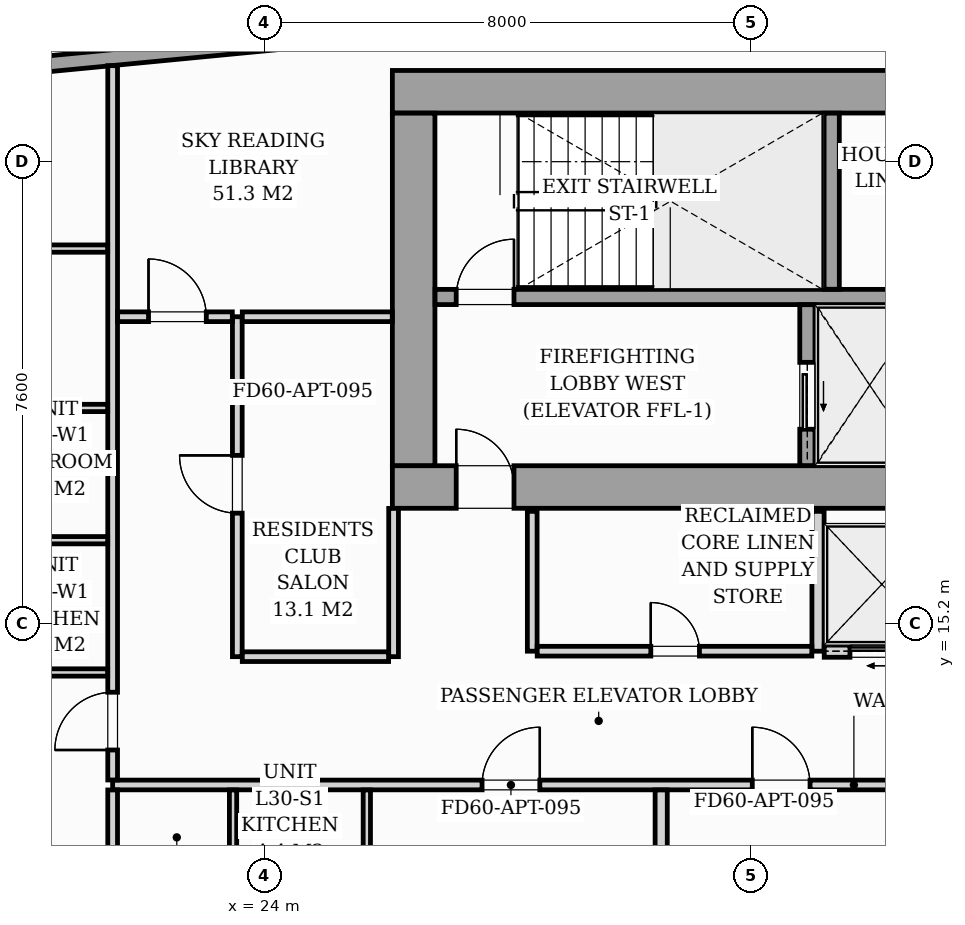
"""IFC4 building model, lengths in metres.
Left out: names, types, materials, properties, quantities, classifications, styles, units other than length and angle.
Written with IfcOpenShell. Run it as: python <this file> out.ifc"""

import sys

from ifc_helpers import new_model, si_unit, direction, frame, frame_2d, origin, origin_2d, place, context, subcontext, project, spatial, rectangle, i_section, extrude, source, transform, mapped, element, fill, save


model = new_model("IFC4")
c1 = context("Model", 3, precision=1e-05, world=origin(), true_north=direction((0.0, 1.0)))
c2 = subcontext(c1, "Body", "Model", "MODEL_VIEW")
j1 = project(units=[si_unit("LENGTHUNIT", "METRE"), si_unit("PLANEANGLEUNIT", "RADIAN")], contexts=[c1])
p1 = place(None, origin())
s1 = spatial("IfcSite", under=j1, at=p1, CompositionType="ELEMENT")
p2 = place(p1, origin())
s2 = spatial("IfcBuilding", under=s1, at=p2, CompositionType="ELEMENT")
p3 = place(p2, frame((0.0, 0.0, 106.6)))
s3 = spatial("IfcBuildingStorey", under=s2, at=p3, CompositionType="ELEMENT", Elevation=106.6)
m1 = source(origin(), c2, "Body", "SweptSolid", [
    extrude(i_section(OverallWidth=0.427, OverallDepth=0.483, WebThickness=0.051, FlangeThickness=0.082, FilletRadius=0.018, at=origin_2d()), origin(), (0.0, 0.0, 1.0), 3.196),
])
for number, where, z_axis, x_axis in (
    (1, (26.4, 17.4, 0.002), (0.0, 0.0, 1.0), (1.0, 0.0, 0.0)),
    (2, (33.12, 17.4, 0.002), (0.0, 0.0, 1.0), (1.0, 0.0, 0.0)),
    (3, (26.4, 24.0, 0.002), (0.0, 0.0, 1.0), (1.0, 0.0, 0.0)),
    (4, (33.12, 24.0, 0.002), (0.0, 0.0, 1.0), (1.0, 0.0, 0.0)),
):
    element("IfcColumn", number, at=place(p3, frame(where, z_axis=z_axis, x_axis=x_axis)), inside=s3, PredefinedType="PILASTER", context=c2, shape_type="MappedRepresentation", body=[
        mapped(m1, transform((0.0, 0.0, 0.0), scale=1.0)),
    ])
p4 = place(p3, frame((11.08, 23.508, 0.0), z_axis=(0.0, 0.0, 1.0), x_axis=(0.995396638587, 0.095841180552, 0.0)))
e5 = element("IfcWall", 5, at=p4, inside=s3, PredefinedType="STANDARD", context=c2, shape_type="SweptSolid", body=[
    extrude(rectangle(XDim=19.11, YDim=0.26, at=frame_2d((9.555, 0.0))), origin(), (0.0, 0.0, 1.0), 2.94),
])
p5 = place(p4, frame((7.159, 0.0, 0.0)))
e6 = element("IfcOpeningElement", 6, at=p5, cuts=e5, PredefinedType="OPENING", context=c2, shape_type="SweptSolid", body=[
    extrude(rectangle(XDim=1.8, YDim=2.06, at=frame_2d((0.9, 1.03))), frame((0.0, 0.14, 0.0), z_axis=(0.0, -1.0, 0.0), x_axis=(1.0, 0.0, 0.0)), (0.0, 0.0, 1.0), 0.28),
])
p6 = place(p4, frame((2.05, 0.0, 0.65)))
e7 = element("IfcOpeningElement", 7, at=p6, cuts=e5, PredefinedType="OPENING", context=c2, shape_type="SweptSolid", body=[
    extrude(rectangle(XDim=1.6, YDim=1.5, at=frame_2d((0.8, 0.75))), frame((0.0, 0.14, 0.0), z_axis=(0.0, -1.0, 0.0), x_axis=(1.0, 0.0, 0.0)), (0.0, 0.0, 1.0), 0.28),
])
p7 = place(p3, frame((26.1, 17.45, 0.0), z_axis=(0.0, 0.0, 1.0), x_axis=(1.0, 0.0, 0.0)))
e8 = element("IfcWall", 8, at=p7, inside=s3, PredefinedType="SHEAR", context=c2, shape_type="SweptSolid", body=[
    extrude(rectangle(XDim=19.8, YDim=0.7, at=frame_2d((9.9, 0.0))), origin(), (0.0, 0.0, 1.0), 3.2),
])
p8 = place(p7, frame((1.05, 0.0, 0.0)))
e9 = element("IfcOpeningElement", 9, at=p8, cuts=e8, PredefinedType="OPENING", context=c2, shape_type="SweptSolid", body=[
    extrude(rectangle(XDim=0.95, YDim=2.06, at=frame_2d((0.475, 1.03))), frame((0.0, 0.36, 0.0), z_axis=(0.0, -1.0, 0.0), x_axis=(1.0, 0.0, 0.0)), (0.0, 0.0, 1.0), 0.72),
])
p9 = place(p7, frame((9.48, 0.0, 0.0)))
e10 = element("IfcOpeningElement", 10, at=p9, cuts=e8, PredefinedType="OPENING", context=c2, shape_type="SweptSolid", body=[
    extrude(rectangle(XDim=0.85, YDim=2.0, at=frame_2d((0.425, 1.0))), frame((0.0, 0.36, 0.0), z_axis=(0.0, -1.0, 0.0), x_axis=(1.0, 0.0, 0.0)), (0.0, 0.0, 1.0), 0.72),
])
p10 = place(p7, frame((17.65, 0.0, 0.0)))
e11 = element("IfcOpeningElement", 11, at=p10, cuts=e8, PredefinedType="OPENING", context=c2, shape_type="SweptSolid", body=[
    extrude(rectangle(XDim=0.95, YDim=2.06, at=frame_2d((0.475, 1.03))), frame((0.0, 0.36, 0.0), z_axis=(0.0, -1.0, 0.0), x_axis=(1.0, 0.0, 0.0)), (0.0, 0.0, 1.0), 0.72),
])
p11 = place(p3, frame((26.1, 23.95, 0.0), z_axis=(0.0, 0.0, 1.0), x_axis=(1.0, 0.0, 0.0)))
e12 = element("IfcWall", 12, at=p11, inside=s3, PredefinedType="SHEAR", context=c2, shape_type="SweptSolid", body=[
    extrude(rectangle(XDim=19.8, YDim=0.7, at=frame_2d((9.9, 0.0))), origin(), (0.0, 0.0, 1.0), 3.2),
])
p12 = place(p3, frame((26.45, 17.802, 0.0), z_axis=(0.0, 0.0, 1.0), x_axis=(0.0, 1.0, 0.0)))
e13 = element("IfcWall", 13, at=p12, inside=s3, PredefinedType="SHEAR", context=c2, shape_type="SweptSolid", body=[
    extrude(rectangle(XDim=5.796, YDim=0.7, at=frame_2d((2.898, 0.0))), origin(), (0.0, 0.0, 1.0), 3.2),
])
p13 = place(p3, frame((26.802, 20.575, 0.0), z_axis=(0.0, 0.0, 1.0), x_axis=(1.0, 0.0, 0.0)))
e14 = element("IfcWall", 14, at=p13, inside=s3, PredefinedType="SOLIDWALL", context=c2, shape_type="SweptSolid", body=[
    extrude(rectangle(XDim=8.148, YDim=0.25, at=frame_2d((4.074, 0.0))), origin(), (0.0, 0.0, 1.0), 3.2),
])
p14 = place(p13, frame((0.348, 0.0, 0.0)))
e15 = element("IfcOpeningElement", 15, at=p14, cuts=e14, PredefinedType="OPENING", context=c2, shape_type="SweptSolid", body=[
    extrude(rectangle(XDim=0.95, YDim=2.06, at=frame_2d((0.475, 1.03))), frame((0.0, 0.135, 0.0), z_axis=(0.0, -1.0, 0.0), x_axis=(1.0, 0.0, 0.0)), (0.0, 0.0, 1.0), 0.27),
])
p15 = place(p3, frame((33.325, 20.702, 0.0), z_axis=(0.0, 0.0, 1.0), x_axis=(0.0, 1.0, 0.0)))
e16 = element("IfcWall", 16, at=p15, inside=s3, PredefinedType="SOLIDWALL", context=c2, shape_type="SweptSolid", body=[
    extrude(rectangle(XDim=2.896, YDim=0.25, at=frame_2d((1.448, 0.0))), origin(), (0.0, 0.0, 1.0), 3.2),
])
p16 = place(p3, frame((32.925, 17.802, 0.0), z_axis=(0.0, 0.0, 1.0), x_axis=(0.0, 1.0, 0.0)))
e17 = element("IfcWall", 17, at=p16, inside=s3, PredefinedType="SOLIDWALL", context=c2, shape_type="SweptSolid", body=[
    extrude(rectangle(XDim=2.646, YDim=0.25, at=frame_2d((1.323, 0.0))), origin(), (0.0, 0.0, 1.0), 3.2),
])
p17 = place(p16, frame((0.598, 0.0, 0.0)))
e18 = element("IfcOpeningElement", 18, at=p17, cuts=e17, PredefinedType="OPENING", context=c2, shape_type="SweptSolid", body=[
    extrude(rectangle(XDim=1.1, YDim=2.08, at=frame_2d((0.55, 1.04))), frame((0.0, 0.135, 0.0), z_axis=(0.0, -1.0, 0.0), x_axis=(1.0, 0.0, 0.0)), (0.0, 0.0, 1.0), 0.27),
])
p18 = place(p3, frame((28.4, 14.75, 0.0), z_axis=(0.0, 0.0, 1.0), x_axis=(0.0, 1.0, 0.0)))
e19 = element("IfcWall", 19, at=p18, inside=s3, PredefinedType="PARTITIONING", context=c2, shape_type="SweptSolid", body=[
    extrude(rectangle(XDim=2.3, YDim=0.16, at=frame_2d((1.15, 0.0))), origin(), (0.0, 0.0, 1.0), 2.94),
])
p19 = place(p3, frame((33.1, 14.75, 0.0), z_axis=(0.0, 0.0, 1.0), x_axis=(0.0, 1.0, 0.0)))
e20 = element("IfcWall", 20, at=p19, inside=s3, PredefinedType="PARTITIONING", context=c2, shape_type="SweptSolid", body=[
    extrude(rectangle(XDim=2.3, YDim=0.2, at=frame_2d((1.15, 0.0))), origin(), (0.0, 0.0, 1.0), 2.94),
])
p20 = place(p3, frame((28.482, 14.75, 0.0), z_axis=(0.0, 0.0, 1.0), x_axis=(1.0, 0.0, 0.0)))
e21 = element("IfcWall", 21, at=p20, inside=s3, PredefinedType="PARTITIONING", context=c2, shape_type="SweptSolid", body=[
    extrude(rectangle(XDim=4.516, YDim=0.16, at=frame_2d((2.258, 0.0))), origin(), (0.0, 0.0, 1.0), 2.94),
])
p21 = place(p20, frame((1.868, 0.0, 0.0)))
e22 = element("IfcOpeningElement", 22, at=p21, cuts=e21, PredefinedType="OPENING", context=c2, shape_type="SweptSolid", body=[
    extrude(rectangle(XDim=0.8, YDim=2.05, at=frame_2d((0.4, 1.025))), frame((0.0, 0.09, 0.0), z_axis=(0.0, -1.0, 0.0), x_axis=(1.0, 0.0, 0.0)), (0.0, 0.0, 1.0), 0.18),
])
p22 = place(p3, frame((33.202, 14.75, 0.0), z_axis=(0.0, 0.0, 1.0), x_axis=(1.0, 0.0, 0.0)))
e23 = element("IfcWall", 23, at=p22, inside=s3, PredefinedType="PARTITIONING", context=c2, shape_type="SweptSolid", body=[
    extrude(rectangle(XDim=1.896, YDim=0.2, at=frame_2d((0.948, 0.0))), origin(), (0.0, 0.0, 1.0), 2.94),
])
p23 = place(p22, frame((0.423, 0.0, 0.0)))
e24 = element("IfcOpeningElement", 24, at=p23, cuts=e23, PredefinedType="OPENING", context=c2, shape_type="SweptSolid", body=[
    extrude(rectangle(XDim=1.05, YDim=2.08, at=frame_2d((0.525, 1.04))), frame((0.0, 0.11, 0.0), z_axis=(0.0, -1.0, 0.0), x_axis=(1.0, 0.0, 0.0)), (0.0, 0.0, 1.0), 0.22),
])
p24 = place(p3, frame((21.5, 12.55, 0.0), z_axis=(0.0, 0.0, 1.0), x_axis=(1.0, 0.0, 0.0)))
e25 = element("IfcWall", 25, at=p24, inside=s3, PredefinedType="PARTITIONING", context=c2, shape_type="SweptSolid", body=[
    extrude(rectangle(XDim=24.38, YDim=0.16, at=frame_2d((12.19, 0.0))), origin(), (0.0, 0.0, 1.0), 2.94),
])
p25 = place(p24, frame((6.075, 0.0, 0.0)))
e26 = element("IfcOpeningElement", 26, at=p25, cuts=e25, PredefinedType="OPENING", context=c2, shape_type="SweptSolid", body=[
    extrude(rectangle(XDim=0.95, YDim=2.06, at=frame_2d((0.475, 1.03))), frame((0.0, 0.09, 0.0), z_axis=(0.0, -1.0, 0.0), x_axis=(1.0, 0.0, 0.0)), (0.0, 0.0, 1.0), 0.18),
])
p26 = place(p24, frame((10.519, 0.0, 0.0)))
e27 = element("IfcOpeningElement", 27, at=p26, cuts=e25, PredefinedType="OPENING", context=c2, shape_type="SweptSolid", body=[
    extrude(rectangle(XDim=0.95, YDim=2.06, at=frame_2d((0.475, 1.03))), frame((0.0, 0.09, 0.0), z_axis=(0.0, -1.0, 0.0), x_axis=(1.0, 0.0, 0.0)), (0.0, 0.0, 1.0), 0.18),
])
p27 = place(p24, frame((18.208, 0.0, 0.0)))
e28 = element("IfcOpeningElement", 28, at=p27, cuts=e25, PredefinedType="OPENING", context=c2, shape_type="SweptSolid", body=[
    extrude(rectangle(XDim=0.95, YDim=2.06, at=frame_2d((0.475, 1.03))), frame((0.0, 0.09, 0.0), z_axis=(0.0, -1.0, 0.0), x_axis=(1.0, 0.0, 0.0)), (0.0, 0.0, 1.0), 0.18),
])
p28 = place(p3, frame((21.5, 4.812, 0.0), z_axis=(0.0, 0.0, 1.0), x_axis=(0.0, 1.0, 0.0)))
e29 = element("IfcWall", 29, at=p28, inside=s3, PredefinedType="PARTITIONING", context=c2, shape_type="SweptSolid", body=[
    extrude(rectangle(XDim=7.656, YDim=0.16, at=frame_2d((3.828, 0.0))), origin(), (0.0, 0.0, 1.0), 2.94),
])
p29 = place(p3, frame((21.5, 12.632, 0.0), z_axis=(0.0, 0.0, 1.0), x_axis=(0.0, 1.0, 0.0)))
e30 = element("IfcWall", 30, at=p29, inside=s3, PredefinedType="PARTITIONING", context=c2, shape_type="SweptSolid", body=[
    extrude(rectangle(XDim=11.747, YDim=0.16, at=frame_2d((5.873, 0.0))), origin(), (0.0, 0.0, 1.0), 2.94),
])
p30 = place(p29, frame((0.493, 0.0, 0.0)))
e31 = element("IfcOpeningElement", 31, at=p30, cuts=e30, PredefinedType="OPENING", context=c2, shape_type="SweptSolid", body=[
    extrude(rectangle(XDim=0.95, YDim=2.06, at=frame_2d((0.475, 1.03))), frame((0.0, 0.09, 0.0), z_axis=(0.0, -1.0, 0.0), x_axis=(1.0, 0.0, 0.0)), (0.0, 0.0, 1.0), 0.18),
])
for number, where, z_axis, x_axis in (
    (32, (25.68, 10.362, 0.0), (0.0, 0.0, 1.0), (0.0, 1.0, 0.0)),
    (33, (23.48, 10.362, 0.0), (0.0, 0.0, 1.0), (0.0, 1.0, 0.0)),
):
    element("IfcWall", number, at=place(p3, frame(where, z_axis=z_axis, x_axis=x_axis)), inside=s3, PredefinedType="PARTITIONING", context=c2, shape_type="SweptSolid", body=[
        extrude(rectangle(XDim=2.106, YDim=0.12, at=frame_2d((1.053, 0.0))), origin(), (0.0, 0.0, 1.0), 2.94),
    ])
p31 = place(p3, frame((30.521, 5.681, 0.0), z_axis=(0.0, 0.0, 1.0), x_axis=(0.0, 1.0, 0.0)))
e34 = element("IfcWall", 34, at=p31, inside=s3, PredefinedType="PARTITIONING", context=c2, shape_type="SweptSolid", body=[
    extrude(rectangle(XDim=6.787, YDim=0.2, at=frame_2d((3.394, 0.0))), origin(), (0.0, 0.0, 1.0), 2.94),
])
for number, where, z_axis, x_axis in (
    (35, (19.162, 16.575, 0.0), (0.0, 0.0, 1.0), (1.0, 0.0, 0.0)),
    (36, (19.162, 14.4, 0.0), (0.0, 0.0, 1.0), (1.0, 0.0, 0.0)),
    (37, (19.162, 18.75, 0.0), (0.0, 0.0, 1.0), (1.0, 0.0, 0.0)),
):
    element("IfcWall", number, at=place(p3, frame(where, z_axis=z_axis, x_axis=x_axis)), inside=s3, PredefinedType="PARTITIONING", context=c2, shape_type="SweptSolid", body=[
        extrude(rectangle(XDim=2.256, YDim=0.12, at=frame_2d((1.128, 0.0))), origin(), (0.0, 0.0, 1.0), 2.94),
    ])
p32 = place(p3, frame((10.293, 21.371, 0.0), z_axis=(0.0, 0.0, 1.0), x_axis=(1.0, 0.0, 0.0)))
e38 = element("IfcWall", 38, at=p32, inside=s3, PredefinedType="PARTITIONING", context=c2, shape_type="SweptSolid", body=[
    extrude(rectangle(XDim=11.125, YDim=0.12, at=frame_2d((5.562, 0.0))), origin(), (0.0, 0.0, 1.0), 2.94),
])
p33 = place(p32, frame((6.33, 0.0, 0.0)))
e39 = element("IfcOpeningElement", 39, at=p33, cuts=e38, PredefinedType="OPENING", context=c2, shape_type="SweptSolid", body=[
    extrude(rectangle(XDim=0.85, YDim=2.05, at=frame_2d((0.425, 1.025))), frame((0.0, 0.07, 0.0), z_axis=(0.0, -1.0, 0.0), x_axis=(1.0, 0.0, 0.0)), (0.0, 0.0, 1.0), 0.14),
])
p34 = place(p3, frame((23.55, 14.66, 0.0), z_axis=(0.0, 0.0, 1.0), x_axis=(0.0, 1.0, 0.0)))
e40 = element("IfcWall", 40, at=p34, inside=s3, PredefinedType="PARTITIONING", context=c2, shape_type="SweptSolid", body=[
    extrude(rectangle(XDim=5.59, YDim=0.16, at=frame_2d((2.795, 0.0))), origin(), (0.0, 0.0, 1.0), 2.94),
])
p35 = place(p34, frame((2.36, 0.0, 0.0)))
e41 = element("IfcOpeningElement", 41, at=p35, cuts=e40, PredefinedType="OPENING", context=c2, shape_type="SweptSolid", body=[
    extrude(rectangle(XDim=0.95, YDim=2.06, at=frame_2d((0.475, 1.03))), frame((0.0, 0.09, 0.0), z_axis=(0.0, -1.0, 0.0), x_axis=(1.0, 0.0, 0.0)), (0.0, 0.0, 1.0), 0.18),
])
p36 = place(p3, frame((21.582, 20.25, 0.0), z_axis=(0.0, 0.0, 1.0), x_axis=(1.0, 0.0, 0.0)))
e42 = element("IfcWall", 42, at=p36, inside=s3, PredefinedType="PARTITIONING", context=c2, shape_type="SweptSolid", body=[
    extrude(rectangle(XDim=1.886, YDim=0.16, at=frame_2d((0.943, 0.0))), origin(), (0.0, 0.0, 1.0), 2.94),
])
p37 = place(p36, frame((0.508, 0.0, 0.0)))
e43 = element("IfcOpeningElement", 43, at=p37, cuts=e42, PredefinedType="OPENING", context=c2, shape_type="SweptSolid", body=[
    extrude(rectangle(XDim=0.95, YDim=2.06, at=frame_2d((0.475, 1.03))), frame((0.0, 0.09, 0.0), z_axis=(0.0, -1.0, 0.0), x_axis=(1.0, 0.0, 0.0)), (0.0, 0.0, 1.0), 0.18),
])
p38 = place(p3, frame((23.632, 20.25, 0.0), z_axis=(0.0, 0.0, 1.0), x_axis=(1.0, 0.0, 0.0)))
e44 = element("IfcWall", 44, at=p38, inside=s3, PredefinedType="PARTITIONING", context=c2, shape_type="SweptSolid", body=[
    extrude(rectangle(XDim=2.466, YDim=0.16, at=frame_2d((1.233, 0.0))), origin(), (0.0, 0.0, 1.0), 2.94),
])
p39 = place(p3, frame((26.12, 14.66, 0.0), z_axis=(0.0, 0.0, 1.0), x_axis=(0.0, 1.0, 0.0)))
e45 = element("IfcWall", 45, at=p39, inside=s3, PredefinedType="PARTITIONING", context=c2, shape_type="SweptSolid", body=[
    extrude(rectangle(XDim=2.438, YDim=0.16, at=frame_2d((1.219, 0.0))), origin(), (0.0, 0.0, 1.0), 2.94),
])
p40 = place(p3, frame((23.632, 14.66, 0.0), z_axis=(0.0, 0.0, 1.0), x_axis=(1.0, 0.0, 0.0)))
e46 = element("IfcWall", 46, at=p40, inside=s3, PredefinedType="PARTITIONING", context=c2, shape_type="SweptSolid", body=[
    extrude(rectangle(XDim=2.406, YDim=0.16, at=frame_2d((1.203, 0.0))), origin(), (0.0, 0.0, 1.0), 2.94),
])
m2 = source(origin(), c2, "Body", "SweptSolid", [
    extrude(rectangle(XDim=0.95, YDim=2.06, at=frame_2d((0.475, 1.03))), frame((0.0, 0.025, 0.0), z_axis=(0.0, -1.0, 0.0), x_axis=(1.0, 0.0, 0.0)), (0.0, 0.0, 1.0), 0.05),
])
p41 = place(p8, origin())
e47 = element("IfcDoor", 47, at=p41, inside=s3, OperationType="SINGLE_SWING_LEFT", PredefinedType="DOOR", context=c2, shape_type="MappedRepresentation", body=[
    mapped(m2, transform((0.0, 0.0, 0.0), scale=1.0)),
])
fill(e9, e47)
p42 = place(p14, origin())
e48 = element("IfcDoor", 48, at=p42, inside=s3, OperationType="SINGLE_SWING_RIGHT", PredefinedType="DOOR", context=c2, shape_type="MappedRepresentation", body=[
    mapped(m2, transform((0.0, 0.0, 0.0), scale=1.0)),
])
fill(e15, e48)
m3 = source(origin(), c2, "Body", "SweptSolid", [
    extrude(rectangle(XDim=1.1, YDim=2.08, at=frame_2d((0.55, 1.04))), frame((0.0, 0.025, 0.0), z_axis=(0.0, -1.0, 0.0), x_axis=(1.0, 0.0, 0.0)), (0.0, 0.0, 1.0), 0.05),
])
p43 = place(p17, origin())
e49 = element("IfcDoor", 49, at=p43, inside=s3, OperationType="SLIDING_TO_LEFT", PredefinedType="DOOR", context=c2, shape_type="MappedRepresentation", body=[
    mapped(m3, transform((0.0, 0.0, 0.0), scale=1.0)),
])
fill(e18, e49)
m4 = source(origin(), c2, "Body", "SweptSolid", [
    extrude(rectangle(XDim=0.8, YDim=2.05, at=frame_2d((0.4, 1.025))), frame((0.0, 0.025, 0.0), z_axis=(0.0, -1.0, 0.0), x_axis=(1.0, 0.0, 0.0)), (0.0, 0.0, 1.0), 0.05),
])
p44 = place(p21, origin())
e50 = element("IfcDoor", 50, at=p44, inside=s3, OperationType="SINGLE_SWING_LEFT", PredefinedType="DOOR", context=c2, shape_type="MappedRepresentation", body=[
    mapped(m4, transform((0.0, 0.0, 0.0), scale=1.0)),
])
fill(e22, e50)
m5 = source(origin(), c2, "Body", "SweptSolid", [
    extrude(rectangle(XDim=1.05, YDim=2.08, at=frame_2d((0.525, 1.04))), frame((0.0, 0.025, 0.0), z_axis=(0.0, -1.0, 0.0), x_axis=(1.0, 0.0, 0.0)), (0.0, 0.0, 1.0), 0.05),
])
p45 = place(p23, origin())
e51 = element("IfcDoor", 51, at=p45, inside=s3, OperationType="SLIDING_TO_LEFT", PredefinedType="DOOR", context=c2, shape_type="MappedRepresentation", body=[
    mapped(m5, transform((0.0, 0.0, 0.0), scale=1.0)),
])
fill(e24, e51)
m6 = source(origin(), c2, "Body", "SweptSolid", [
    extrude(rectangle(XDim=0.95, YDim=2.06, at=frame_2d((0.475, 1.03))), frame((0.0, 0.025, 0.0), z_axis=(0.0, -1.0, 0.0), x_axis=(1.0, 0.0, 0.0)), (0.0, 0.0, 1.0), 0.05),
])
p46 = place(p25, origin())
e52 = element("IfcDoor", 52, at=p46, inside=s3, OperationType="SINGLE_SWING_RIGHT", PredefinedType="DOOR", context=c2, shape_type="MappedRepresentation", body=[
    mapped(m6, transform((0.0, 0.0, 0.0), scale=1.0)),
])
fill(e26, e52)
p47 = place(p26, origin())
e53 = element("IfcDoor", 53, at=p47, inside=s3, OperationType="SINGLE_SWING_LEFT", PredefinedType="DOOR", context=c2, shape_type="MappedRepresentation", body=[
    mapped(m6, transform((0.0, 0.0, 0.0), scale=1.0)),
])
fill(e27, e53)
p48 = place(p30, origin())
e54 = element("IfcDoor", 54, at=p48, inside=s3, OperationType="SINGLE_SWING_LEFT", PredefinedType="DOOR", context=c2, shape_type="MappedRepresentation", body=[
    mapped(m6, transform((0.0, 0.0, 0.0), scale=1.0)),
])
fill(e31, e54)
p49 = place(p35, origin())
e55 = element("IfcDoor", 55, at=p49, inside=s3, OperationType="SINGLE_SWING_RIGHT", PredefinedType="DOOR", context=c2, shape_type="MappedRepresentation", body=[
    mapped(m6, transform((0.0, 0.0, 0.0), scale=1.0)),
])
fill(e41, e55)
p50 = place(p37, origin())
e56 = element("IfcDoor", 56, at=p50, inside=s3, OperationType="SINGLE_SWING_LEFT", PredefinedType="DOOR", context=c2, shape_type="MappedRepresentation", body=[
    mapped(m6, transform((0.0, 0.0, 0.0), scale=1.0)),
])
fill(e43, e56)
save(model, sys.argv[1])
